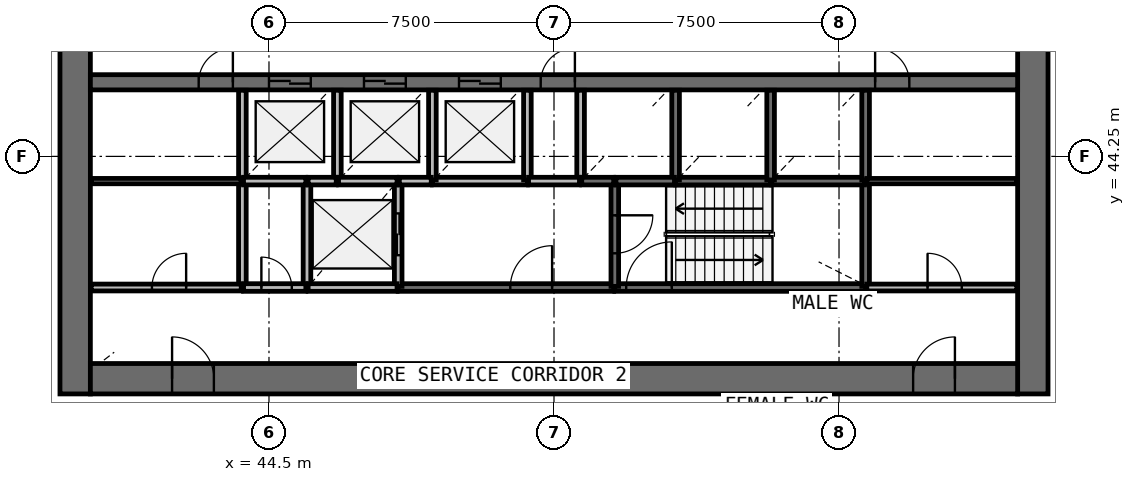
"""IFC4 building model, lengths in metres.
Left out: names, types, materials, properties, quantities, classifications, styles, units other than length and angle.
Written with IfcOpenShell. Run it as: python <this file> out.ifc"""

import sys

from ifc_helpers import new_model, si_unit, direction, frame, frame_2d, origin, place, context, subcontext, project, spatial, rectangle, extrude, source, transform, mapped, element, fill, save


model = new_model("IFC4")
c1 = context("Model", 3, precision=1e-05, world=origin(), true_north=direction((0.0, 1.0)))
c2 = subcontext(c1, "Body", "Model", "MODEL_VIEW")
j1 = project(units=[si_unit("LENGTHUNIT", "METRE"), si_unit("PLANEANGLEUNIT", "RADIAN")], contexts=[c1])
p1 = place(None, origin())
s1 = spatial("IfcSite", under=j1, at=p1, CompositionType="ELEMENT")
p2 = place(p1, origin())
s2 = spatial("IfcBuilding", under=s1, at=p2, CompositionType="ELEMENT")
p3 = place(p2, frame((0.0, 0.0, 100.3)))
s3 = spatial("IfcBuildingStorey", under=s2, at=p3, CompositionType="ELEMENT", Elevation=100.3)
p4 = place(p3, frame((64.6, 38.0, 0.0), z_axis=(0.0, 0.0, 1.0), x_axis=(0.0, 1.0, 0.0)))
e1 = element("IfcWall", 1, at=p4, inside=s3, PredefinedType="SHEAR", context=c2, shape_type="SweptSolid", body=[
    extrude(rectangle(XDim=20.0, YDim=0.8, at=frame_2d((10.0, 0.0))), origin(), (0.0, 0.0, 1.0), 4.1),
])
p5 = place(p4, frame((9.1, 0.0, 0.0)))
e2 = element("IfcOpeningElement", 2, at=p5, cuts=e1, PredefinedType="OPENING", context=c2, shape_type="SweptSolid", body=[
    extrude(rectangle(XDim=1.8, YDim=2.1, at=frame_2d((0.9, 1.05))), frame((0.0, 0.41, 0.0), z_axis=(0.0, -1.0, 0.0), x_axis=(1.0, 0.0, 0.0)), (0.0, 0.0, 1.0), 0.82),
])
p6 = place(p3, frame((39.4, 58.0, 0.0), z_axis=(0.0, 0.0, 1.0), x_axis=(0.0, -1.0, 0.0)))
e3 = element("IfcWall", 3, at=p6, inside=s3, PredefinedType="SHEAR", context=c2, shape_type="SweptSolid", body=[
    extrude(rectangle(XDim=20.0, YDim=0.8, at=frame_2d((10.0, 0.0))), origin(), (0.0, 0.0, 1.0), 4.1),
])
p7 = place(p6, frame((9.1, 0.0, 0.0)))
e4 = element("IfcOpeningElement", 4, at=p7, cuts=e3, PredefinedType="OPENING", context=c2, shape_type="SweptSolid", body=[
    extrude(rectangle(XDim=1.8, YDim=2.1, at=frame_2d((0.9, 1.05))), frame((0.0, 0.41, 0.0), z_axis=(0.0, -1.0, 0.0), x_axis=(1.0, 0.0, 0.0)), (0.0, 0.0, 1.0), 0.82),
])
p8 = place(p3, frame((39.8, 38.4, 0.0), z_axis=(0.0, 0.0, 1.0), x_axis=(1.0, 0.0, 0.0)))
e5 = element("IfcWall", 5, at=p8, inside=s3, PredefinedType="SHEAR", context=c2, shape_type="SweptSolid", body=[
    extrude(rectangle(XDim=24.4, YDim=0.8, at=frame_2d((12.2, 0.0))), origin(), (0.0, 0.0, 1.0), 4.1),
])
p9 = place(p8, frame((21.65, 0.0, 0.0)))
e6 = element("IfcOpeningElement", 6, at=p9, cuts=e5, PredefinedType="OPENING", context=c2, shape_type="SweptSolid", body=[
    extrude(rectangle(XDim=1.1, YDim=2.1, at=frame_2d((0.55, 1.05))), frame((0.0, 0.41, 0.0), z_axis=(0.0, -1.0, 0.0), x_axis=(1.0, 0.0, 0.0)), (0.0, 0.0, 1.0), 0.82),
])
p10 = place(p8, frame((2.15, 0.0, 0.0)))
e7 = element("IfcOpeningElement", 7, at=p10, cuts=e5, PredefinedType="OPENING", context=c2, shape_type="SweptSolid", body=[
    extrude(rectangle(XDim=1.1, YDim=2.1, at=frame_2d((0.55, 1.05))), frame((0.0, 0.41, 0.0), z_axis=(0.0, -1.0, 0.0), x_axis=(1.0, 0.0, 0.0)), (0.0, 0.0, 1.0), 0.82),
])
p11 = place(p3, frame((39.8, 46.2, 0.0), z_axis=(0.0, 0.0, 1.0), x_axis=(1.0, 0.0, 0.0)))
e8 = element("IfcWall", 8, at=p11, inside=s3, PredefinedType="SHEAR", context=c2, shape_type="SweptSolid", body=[
    extrude(rectangle(XDim=24.4, YDim=0.4, at=frame_2d((12.2, 0.0))), origin(), (0.0, 0.0, 1.0), 4.1),
])
p12 = place(p11, frame((4.7, 0.0, 0.0)))
e9 = element("IfcOpeningElement", 9, at=p12, cuts=e8, PredefinedType="OPENING", context=c2, shape_type="SweptSolid", body=[
    extrude(rectangle(XDim=1.1, YDim=2.1, at=frame_2d((0.55, 1.05))), frame((0.0, 0.21, 0.0), z_axis=(0.0, -1.0, 0.0), x_axis=(1.0, 0.0, 0.0)), (0.0, 0.0, 1.0), 0.42),
])
p13 = place(p11, frame((7.2, 0.0, 0.0)))
e10 = element("IfcOpeningElement", 10, at=p13, cuts=e8, PredefinedType="OPENING", context=c2, shape_type="SweptSolid", body=[
    extrude(rectangle(XDim=1.1, YDim=2.1, at=frame_2d((0.55, 1.05))), frame((0.0, 0.21, 0.0), z_axis=(0.0, -1.0, 0.0), x_axis=(1.0, 0.0, 0.0)), (0.0, 0.0, 1.0), 0.42),
])
p14 = place(p11, frame((9.7, 0.0, 0.0)))
e11 = element("IfcOpeningElement", 11, at=p14, cuts=e8, PredefinedType="OPENING", context=c2, shape_type="SweptSolid", body=[
    extrude(rectangle(XDim=1.1, YDim=2.1, at=frame_2d((0.55, 1.05))), frame((0.0, 0.21, 0.0), z_axis=(0.0, -1.0, 0.0), x_axis=(1.0, 0.0, 0.0)), (0.0, 0.0, 1.0), 0.42),
])
p15 = place(p11, frame((20.65, 0.0, 0.0)))
e12 = element("IfcOpeningElement", 12, at=p15, cuts=e8, PredefinedType="OPENING", context=c2, shape_type="SweptSolid", body=[
    extrude(rectangle(XDim=0.9, YDim=2.1, at=frame_2d((0.45, 1.05))), frame((0.0, 0.21, 0.0), z_axis=(0.0, -1.0, 0.0), x_axis=(1.0, 0.0, 0.0)), (0.0, 0.0, 1.0), 0.42),
])
p16 = place(p11, frame((2.85, 0.0, 0.0)))
e13 = element("IfcOpeningElement", 13, at=p16, cuts=e8, PredefinedType="OPENING", context=c2, shape_type="SweptSolid", body=[
    extrude(rectangle(XDim=0.9, YDim=2.1, at=frame_2d((0.45, 1.05))), frame((0.0, 0.21, 0.0), z_axis=(0.0, -1.0, 0.0), x_axis=(1.0, 0.0, 0.0)), (0.0, 0.0, 1.0), 0.42),
])
p17 = place(p11, frame((11.85, 0.0, 0.0)))
e14 = element("IfcOpeningElement", 14, at=p17, cuts=e8, PredefinedType="OPENING", context=c2, shape_type="SweptSolid", body=[
    extrude(rectangle(XDim=0.9, YDim=2.1, at=frame_2d((0.45, 1.05))), frame((0.0, 0.21, 0.0), z_axis=(0.0, -1.0, 0.0), x_axis=(1.0, 0.0, 0.0)), (0.0, 0.0, 1.0), 0.42),
])
p18 = place(p3, frame((53.6, 40.8, 0.0), z_axis=(0.0, 0.0, 1.0), x_axis=(1.0, 0.0, 0.0)))
e15 = element("IfcWall", 15, at=p18, inside=s3, PredefinedType="SOLIDWALL", context=c2, shape_type="SweptSolid", body=[
    extrude(rectangle(XDim=6.6, YDim=0.2, at=frame_2d((3.3, 0.0))), origin(), (0.0, 0.0, 1.0), 3.7),
])
p19 = place(p18, frame((0.3, 0.0, 0.0)))
e16 = element("IfcOpeningElement", 16, at=p19, cuts=e15, PredefinedType="OPENING", context=c2, shape_type="SweptSolid", body=[
    extrude(rectangle(XDim=1.2, YDim=2.1, at=frame_2d((0.6, 1.05))), frame((0.0, 0.11, 0.0), z_axis=(0.0, -1.0, 0.0), x_axis=(1.0, 0.0, 0.0)), (0.0, 0.0, 1.0), 0.22),
])
p20 = place(p3, frame((47.9, 40.8, 0.0), z_axis=(0.0, 0.0, 1.0), x_axis=(1.0, 0.0, 0.0)))
e17 = element("IfcWall", 17, at=p20, inside=s3, PredefinedType="SOLIDWALL", context=c2, shape_type="SweptSolid", body=[
    extrude(rectangle(XDim=5.67, YDim=0.2, at=frame_2d((2.835, 0.0))), origin(), (0.0, 0.0, 1.0), 3.7),
])
p21 = place(p20, frame((2.95, 0.0, 0.0)))
e18 = element("IfcOpeningElement", 18, at=p21, cuts=e17, PredefinedType="OPENING", context=c2, shape_type="SweptSolid", body=[
    extrude(rectangle(XDim=1.1, YDim=2.1, at=frame_2d((0.55, 1.05))), frame((0.0, 0.11, 0.0), z_axis=(0.0, -1.0, 0.0), x_axis=(1.0, 0.0, 0.0)), (0.0, 0.0, 1.0), 0.22),
])
for number, where, z_axis, x_axis in (
    (19, (43.8, 43.6, 0.0), (0.0, 0.0, 1.0), (0.0, -1.0, 0.0)),
    (20, (45.5, 43.6, 0.0), (0.0, 0.0, 1.0), (0.0, -1.0, 0.0)),
):
    element("IfcWall", number, at=place(p3, frame(where, z_axis=z_axis, x_axis=x_axis)), inside=s3, PredefinedType="SOLIDWALL", context=c2, shape_type="SweptSolid", body=[
        extrude(rectangle(XDim=2.8, YDim=0.2, at=frame_2d((1.4, 0.0))), origin(), (0.0, 0.0, 1.0), 3.7),
    ])
p22 = place(p3, frame((47.9, 40.83, 0.0), z_axis=(0.0, 0.0, 1.0), x_axis=(0.0, 1.0, 0.0)))
e21 = element("IfcWall", 21, at=p22, inside=s3, PredefinedType="SOLIDWALL", context=c2, shape_type="SweptSolid", body=[
    extrude(rectangle(XDim=2.77, YDim=0.2, at=frame_2d((1.385, 0.0))), origin(), (0.0, 0.0, 1.0), 3.7),
])
p23 = place(p22, frame((0.82, 0.0, 0.0)))
e22 = element("IfcOpeningElement", 22, at=p23, cuts=e21, PredefinedType="OPENING", context=c2, shape_type="SweptSolid", body=[
    extrude(rectangle(XDim=1.1, YDim=2.1, at=frame_2d((0.55, 1.05))), frame((0.0, 0.11, 0.0), z_axis=(0.0, -1.0, 0.0), x_axis=(1.0, 0.0, 0.0)), (0.0, 0.0, 1.0), 0.22),
])
p24 = place(p3, frame((60.2, 40.83, 0.0), z_axis=(0.0, 0.0, 1.0), x_axis=(0.0, 1.0, 0.0)))
e23 = element("IfcWall", 23, at=p24, inside=s3, PredefinedType="SOLIDWALL", context=c2, shape_type="SweptSolid", body=[
    extrude(rectangle(XDim=2.77, YDim=0.2, at=frame_2d((1.385, 0.0))), origin(), (0.0, 0.0, 1.0), 3.7),
])
p25 = place(p3, frame((53.6, 43.6, 0.0), z_axis=(0.0, 0.0, 1.0), x_axis=(0.0, -1.0, 0.0)))
e24 = element("IfcWall", 24, at=p25, inside=s3, PredefinedType="SOLIDWALL", context=c2, shape_type="SweptSolid", body=[
    extrude(rectangle(XDim=2.77, YDim=0.2, at=frame_2d((1.385, 0.0))), origin(), (0.0, 0.0, 1.0), 3.7),
])
p26 = place(p25, frame((0.9, 0.0, 0.0)))
e25 = element("IfcOpeningElement", 25, at=p26, cuts=e24, PredefinedType="OPENING", context=c2, shape_type="SweptSolid", body=[
    extrude(rectangle(XDim=1.0, YDim=2.1, at=frame_2d((0.5, 1.05))), frame((0.0, 0.11, 0.0), z_axis=(0.0, -1.0, 0.0), x_axis=(1.0, 0.0, 0.0)), (0.0, 0.0, 1.0), 0.22),
])
for number, where, z_axis, x_axis in (
    (26, (48.8, 43.6, 0.0), (0.0, 0.0, 1.0), (1.0, 0.0, 0.0)),
    (27, (55.2, 43.6, 0.0), (0.0, 0.0, 1.0), (1.0, 0.0, 0.0)),
):
    element("IfcWall", number, at=place(p3, frame(where, z_axis=z_axis, x_axis=x_axis)), inside=s3, PredefinedType="SOLIDWALL", context=c2, shape_type="SweptSolid", body=[
        extrude(rectangle(XDim=2.5, YDim=0.2, at=frame_2d((1.25, 0.0))), origin(), (0.0, 0.0, 1.0), 3.7),
    ])
p27 = place(p3, frame((57.73, 43.6, 0.0), z_axis=(0.0, 0.0, 1.0), x_axis=(1.0, 0.0, 0.0)))
e28 = element("IfcWall", 28, at=p27, inside=s3, PredefinedType="SOLIDWALL", context=c2, shape_type="SweptSolid", body=[
    extrude(rectangle(XDim=2.44, YDim=0.2, at=frame_2d((1.22, 0.0))), origin(), (0.0, 0.0, 1.0), 3.7),
])
p28 = place(p3, frame((45.53, 40.8, 0.0), z_axis=(0.0, 0.0, 1.0), x_axis=(1.0, 0.0, 0.0)))
e29 = element("IfcWall", 29, at=p28, inside=s3, PredefinedType="SOLIDWALL", context=c2, shape_type="SweptSolid", body=[
    extrude(rectangle(XDim=2.34, YDim=0.2, at=frame_2d((1.17, 0.0))), origin(), (0.0, 0.0, 1.0), 3.7),
])
p29 = place(p3, frame((43.8, 45.99, 0.0), z_axis=(0.0, 0.0, 1.0), x_axis=(0.0, -1.0, 0.0)))
e30 = element("IfcWall", 30, at=p29, inside=s3, PredefinedType="SOLIDWALL", context=c2, shape_type="SweptSolid", body=[
    extrude(rectangle(XDim=2.36, YDim=0.2, at=frame_2d((1.18, 0.0))), origin(), (0.0, 0.0, 1.0), 3.7),
])
p30 = place(p3, frame((46.3, 43.6, 0.0), z_axis=(0.0, 0.0, 1.0), x_axis=(0.0, 1.0, 0.0)))
e31 = element("IfcWall", 31, at=p30, inside=s3, PredefinedType="SOLIDWALL", context=c2, shape_type="SweptSolid", body=[
    extrude(rectangle(XDim=2.39, YDim=0.2, at=frame_2d((1.195, 0.0))), origin(), (0.0, 0.0, 1.0), 3.7),
])
for number, where, z_axis, x_axis in (
    (32, (48.8, 43.63, 0.0), (0.0, 0.0, 1.0), (0.0, 1.0, 0.0)),
    (33, (51.3, 43.63, 0.0), (0.0, 0.0, 1.0), (0.0, 1.0, 0.0)),
):
    element("IfcWall", number, at=place(p3, frame(where, z_axis=z_axis, x_axis=x_axis)), inside=s3, PredefinedType="SOLIDWALL", context=c2, shape_type="SweptSolid", body=[
        extrude(rectangle(XDim=2.36, YDim=0.2, at=frame_2d((1.18, 0.0))), origin(), (0.0, 0.0, 1.0), 3.7),
    ])
p31 = place(p3, frame((52.7, 45.99, 0.0), z_axis=(0.0, 0.0, 1.0), x_axis=(0.0, -1.0, 0.0)))
e34 = element("IfcWall", 34, at=p31, inside=s3, PredefinedType="SOLIDWALL", context=c2, shape_type="SweptSolid", body=[
    extrude(rectangle(XDim=2.39, YDim=0.2, at=frame_2d((1.195, 0.0))), origin(), (0.0, 0.0, 1.0), 3.7),
])
for number, where, z_axis, x_axis in (
    (35, (55.2, 43.63, 0.0), (0.0, 0.0, 1.0), (0.0, 1.0, 0.0)),
    (36, (57.7, 43.63, 0.0), (0.0, 0.0, 1.0), (0.0, 1.0, 0.0)),
    (37, (60.2, 43.63, 0.0), (0.0, 0.0, 1.0), (0.0, 1.0, 0.0)),
):
    element("IfcWall", number, at=place(p3, frame(where, z_axis=z_axis, x_axis=x_axis)), inside=s3, PredefinedType="SOLIDWALL", context=c2, shape_type="SweptSolid", body=[
        extrude(rectangle(XDim=2.36, YDim=0.2, at=frame_2d((1.18, 0.0))), origin(), (0.0, 0.0, 1.0), 3.7),
    ])
p32 = place(p3, frame((43.83, 43.6, 0.0), z_axis=(0.0, 0.0, 1.0), x_axis=(1.0, 0.0, 0.0)))
e38 = element("IfcWall", 38, at=p32, inside=s3, PredefinedType="SOLIDWALL", context=c2, shape_type="SweptSolid", body=[
    extrude(rectangle(XDim=1.64, YDim=0.2, at=frame_2d((0.82, 0.0))), origin(), (0.0, 0.0, 1.0), 3.7),
])
p33 = place(p3, frame((43.83, 40.8, 0.0), z_axis=(0.0, 0.0, 1.0), x_axis=(1.0, 0.0, 0.0)))
e39 = element("IfcWall", 39, at=p33, inside=s3, PredefinedType="SOLIDWALL", context=c2, shape_type="SweptSolid", body=[
    extrude(rectangle(XDim=1.64, YDim=0.2, at=frame_2d((0.82, 0.0))), origin(), (0.0, 0.0, 1.0), 3.7),
])
p34 = place(p33, frame((0.47, 0.0, 0.0)))
e40 = element("IfcOpeningElement", 40, at=p34, cuts=e39, PredefinedType="OPENING", context=c2, shape_type="SweptSolid", body=[
    extrude(rectangle(XDim=0.8, YDim=2.1, at=frame_2d((0.4, 1.05))), frame((0.0, 0.11, 0.0), z_axis=(0.0, -1.0, 0.0), x_axis=(1.0, 0.0, 0.0)), (0.0, 0.0, 1.0), 0.22),
])
for number, where, z_axis, x_axis in (
    (41, (46.33, 43.6, 0.0), (0.0, 0.0, 1.0), (1.0, 0.0, 0.0)),
    (42, (53.63, 43.6, 0.0), (0.0, 0.0, 1.0), (1.0, 0.0, 0.0)),
):
    element("IfcWall", number, at=place(p3, frame(where, z_axis=z_axis, x_axis=x_axis)), inside=s3, PredefinedType="SOLIDWALL", context=c2, shape_type="SweptSolid", body=[
        extrude(rectangle(XDim=1.54, YDim=0.2, at=frame_2d((0.77, 0.0))), origin(), (0.0, 0.0, 1.0), 3.7),
    ])
p35 = place(p3, frame((52.67, 43.6, 0.0), z_axis=(0.0, 0.0, 1.0), x_axis=(-1.0, 0.0, 0.0)))
e43 = element("IfcWall", 43, at=p35, inside=s3, PredefinedType="SOLIDWALL", context=c2, shape_type="SweptSolid", body=[
    extrude(rectangle(XDim=1.34, YDim=0.2, at=frame_2d((0.67, 0.0))), origin(), (0.0, 0.0, 1.0), 3.7),
])
for number, where, z_axis, x_axis in (
    (44, (47.93, 43.6, 0.0), (0.0, 0.0, 1.0), (1.0, 0.0, 0.0)),
    (45, (52.73, 43.6, 0.0), (0.0, 0.0, 1.0), (1.0, 0.0, 0.0)),
):
    element("IfcWall", number, at=place(p3, frame(where, z_axis=z_axis, x_axis=x_axis)), inside=s3, PredefinedType="SOLIDWALL", context=c2, shape_type="SweptSolid", body=[
        extrude(rectangle(XDim=0.84, YDim=0.2, at=frame_2d((0.42, 0.0))), origin(), (0.0, 0.0, 1.0), 3.7),
    ])
p36 = place(p3, frame((45.53, 43.6, 0.0), z_axis=(0.0, 0.0, 1.0), x_axis=(1.0, 0.0, 0.0)))
e46 = element("IfcWall", 46, at=p36, inside=s3, PredefinedType="SOLIDWALL", context=c2, shape_type="SweptSolid", body=[
    extrude(rectangle(XDim=0.74, YDim=0.2, at=frame_2d((0.37, 0.0))), origin(), (0.0, 0.0, 1.0), 3.7),
])
p37 = place(p3, frame((60.23, 40.8, 0.0), z_axis=(0.0, 0.0, 1.0), x_axis=(1.0, 0.0, 0.0)))
e47 = element("IfcWall", 47, at=p37, inside=s3, PredefinedType="PARTITIONING", context=c2, shape_type="SweptSolid", body=[
    extrude(rectangle(XDim=3.95, YDim=0.18, at=frame_2d((1.975, 0.0))), origin(), (0.0, 0.0, 1.0), 3.7),
])
p38 = place(p37, frame((1.6, 0.0, 0.0)))
e48 = element("IfcOpeningElement", 48, at=p38, cuts=e47, PredefinedType="OPENING", context=c2, shape_type="SweptSolid", body=[
    extrude(rectangle(XDim=0.9, YDim=2.1, at=frame_2d((0.45, 1.05))), frame((0.0, 0.1, 0.0), z_axis=(0.0, -1.0, 0.0), x_axis=(1.0, 0.0, 0.0)), (0.0, 0.0, 1.0), 0.2),
])
p39 = place(p3, frame((39.82, 40.8, 0.0), z_axis=(0.0, 0.0, 1.0), x_axis=(1.0, 0.0, 0.0)))
e49 = element("IfcWall", 49, at=p39, inside=s3, PredefinedType="PARTITIONING", context=c2, shape_type="SweptSolid", body=[
    extrude(rectangle(XDim=3.95, YDim=0.18, at=frame_2d((1.975, 0.0))), origin(), (0.0, 0.0, 1.0), 3.7),
])
p40 = place(p39, frame((1.6, 0.0, 0.0)))
e50 = element("IfcOpeningElement", 50, at=p40, cuts=e49, PredefinedType="OPENING", context=c2, shape_type="SweptSolid", body=[
    extrude(rectangle(XDim=0.9, YDim=2.1, at=frame_2d((0.45, 1.05))), frame((0.0, 0.1, 0.0), z_axis=(0.0, -1.0, 0.0), x_axis=(1.0, 0.0, 0.0)), (0.0, 0.0, 1.0), 0.2),
])
for number, where, z_axis, x_axis in (
    (51, (60.23, 43.6, 0.0), (0.0, 0.0, 1.0), (1.0, 0.0, 0.0)),
    (52, (43.77, 43.6, 0.0), (0.0, 0.0, 1.0), (-1.0, 0.0, 0.0)),
):
    element("IfcWall", number, at=place(p3, frame(where, z_axis=z_axis, x_axis=x_axis)), inside=s3, PredefinedType="PARTITIONING", context=c2, shape_type="SweptSolid", body=[
        extrude(rectangle(XDim=3.95, YDim=0.14, at=frame_2d((1.975, 0.0))), origin(), (0.0, 0.0, 1.0), 2.9),
    ])
m1 = source(origin(), c2, "Body", "SweptSolid", [
    extrude(rectangle(XDim=1.1, YDim=2.1, at=frame_2d((0.55, 1.05))), frame((0.0, 0.025, 0.0), z_axis=(0.0, -1.0, 0.0), x_axis=(1.0, 0.0, 0.0)), (0.0, 0.0, 1.0), 0.05),
])
p41 = place(p12, origin())
e53 = element("IfcDoor", 53, at=p41, inside=s3, OperationType="DOUBLE_DOOR_SLIDING", PredefinedType="USERDEFINED", context=c2, shape_type="MappedRepresentation", body=[
    mapped(m1, transform((0.0, 0.0, 0.0), scale=1.0)),
])
fill(e9, e53)
p42 = place(p13, origin())
e54 = element("IfcDoor", 54, at=p42, inside=s3, OperationType="DOUBLE_DOOR_SLIDING", PredefinedType="USERDEFINED", context=c2, shape_type="MappedRepresentation", body=[
    mapped(m1, transform((0.0, 0.0, 0.0), scale=1.0)),
])
fill(e10, e54)
p43 = place(p14, origin())
e55 = element("IfcDoor", 55, at=p43, inside=s3, OperationType="DOUBLE_DOOR_SLIDING", PredefinedType="USERDEFINED", context=c2, shape_type="MappedRepresentation", body=[
    mapped(m1, transform((0.0, 0.0, 0.0), scale=1.0)),
])
fill(e11, e55)
p44 = place(p23, origin())
e56 = element("IfcDoor", 56, at=p44, inside=s3, OperationType="DOUBLE_DOOR_SLIDING", PredefinedType="USERDEFINED", context=c2, shape_type="MappedRepresentation", body=[
    mapped(m1, transform((0.0, 0.0, 0.0), scale=1.0)),
])
fill(e22, e56)
m2 = source(origin(), c2, "Body", "SweptSolid", [
    extrude(rectangle(XDim=1.2, YDim=2.1, at=frame_2d((0.6, 1.05))), frame((0.0, 0.025, 0.0), z_axis=(0.0, -1.0, 0.0), x_axis=(1.0, 0.0, 0.0)), (0.0, 0.0, 1.0), 0.05),
])
p45 = place(p19, origin())
e57 = element("IfcDoor", 57, at=p45, inside=s3, OperationType="SINGLE_SWING_RIGHT", PredefinedType="DOOR", context=c2, shape_type="MappedRepresentation", body=[
    mapped(m2, transform((0.0, 0.0, 0.0), scale=1.0)),
])
fill(e16, e57)
m3 = source(origin(), c2, "Body", "SweptSolid", [
    extrude(rectangle(XDim=1.0, YDim=2.1, at=frame_2d((0.5, 1.05))), frame((0.0, 0.025, 0.0), z_axis=(0.0, -1.0, 0.0), x_axis=(1.0, 0.0, 0.0)), (0.0, 0.0, 1.0), 0.05),
])
p46 = place(p26, origin())
e58 = element("IfcDoor", 58, at=p46, inside=s3, OperationType="SINGLE_SWING_LEFT", PredefinedType="DOOR", context=c2, shape_type="MappedRepresentation", body=[
    mapped(m3, transform((0.0, 0.0, 0.0), scale=1.0)),
])
fill(e25, e58)
m4 = source(origin(), c2, "Body", "SweptSolid", [
    extrude(rectangle(XDim=1.1, YDim=2.1, at=frame_2d((0.55, 1.05))), frame((0.0, 0.025, 0.0), z_axis=(0.0, -1.0, 0.0), x_axis=(1.0, 0.0, 0.0)), (0.0, 0.0, 1.0), 0.05),
])
p47 = place(p21, origin())
e59 = element("IfcDoor", 59, at=p47, inside=s3, OperationType="SINGLE_SWING_RIGHT", PredefinedType="DOOR", context=c2, shape_type="MappedRepresentation", body=[
    mapped(m4, transform((0.0, 0.0, 0.0), scale=1.0)),
])
fill(e18, e59)
m5 = source(origin(), c2, "Body", "SweptSolid", [
    extrude(rectangle(XDim=0.8, YDim=2.1, at=frame_2d((0.4, 1.05))), frame((0.0, 0.025, 0.0), z_axis=(0.0, -1.0, 0.0), x_axis=(1.0, 0.0, 0.0)), (0.0, 0.0, 1.0), 0.05),
])
p48 = place(p34, origin())
e60 = element("IfcDoor", 60, at=p48, inside=s3, OperationType="SINGLE_SWING_LEFT", PredefinedType="DOOR", context=c2, shape_type="MappedRepresentation", body=[
    mapped(m5, transform((0.0, 0.0, 0.0), scale=1.0)),
])
fill(e40, e60)
m6 = source(origin(), c2, "Body", "SweptSolid", [
    extrude(rectangle(XDim=1.1, YDim=2.1, at=frame_2d((0.55, 1.05))), frame((0.0, 0.025, 0.0), z_axis=(0.0, -1.0, 0.0), x_axis=(1.0, 0.0, 0.0)), (0.0, 0.0, 1.0), 0.05),
])
p49 = place(p9, origin())
e61 = element("IfcDoor", 61, at=p49, inside=s3, OperationType="SINGLE_SWING_RIGHT", PredefinedType="DOOR", context=c2, shape_type="MappedRepresentation", body=[
    mapped(m6, transform((0.0, 0.0, 0.0), scale=1.0)),
])
fill(e6, e61)
p50 = place(p10, origin())
e62 = element("IfcDoor", 62, at=p50, inside=s3, OperationType="SINGLE_SWING_LEFT", PredefinedType="DOOR", context=c2, shape_type="MappedRepresentation", body=[
    mapped(m6, transform((0.0, 0.0, 0.0), scale=1.0)),
])
fill(e7, e62)
m7 = source(origin(), c2, "Body", "SweptSolid", [
    extrude(rectangle(XDim=0.9, YDim=2.1, at=frame_2d((0.45, 1.05))), frame((0.0, 0.025, 0.0), z_axis=(0.0, -1.0, 0.0), x_axis=(1.0, 0.0, 0.0)), (0.0, 0.0, 1.0), 0.05),
])
p51 = place(p40, origin())
e63 = element("IfcDoor", 63, at=p51, inside=s3, OperationType="SINGLE_SWING_RIGHT", PredefinedType="DOOR", context=c2, shape_type="MappedRepresentation", body=[
    mapped(m7, transform((0.0, 0.0, 0.0), scale=1.0)),
])
fill(e50, e63)
p52 = place(p15, origin())
e64 = element("IfcDoor", 64, at=p52, inside=s3, OperationType="SINGLE_SWING_LEFT", PredefinedType="DOOR", context=c2, shape_type="MappedRepresentation", body=[
    mapped(m7, transform((0.0, 0.0, 0.0), scale=1.0)),
])
fill(e12, e64)
p53 = place(p38, origin())
e65 = element("IfcDoor", 65, at=p53, inside=s3, OperationType="SINGLE_SWING_LEFT", PredefinedType="DOOR", context=c2, shape_type="MappedRepresentation", body=[
    mapped(m7, transform((0.0, 0.0, 0.0), scale=1.0)),
])
fill(e48, e65)
p54 = place(p16, origin())
e66 = element("IfcDoor", 66, at=p54, inside=s3, OperationType="SINGLE_SWING_RIGHT", PredefinedType="DOOR", context=c2, shape_type="MappedRepresentation", body=[
    mapped(m7, transform((0.0, 0.0, 0.0), scale=1.0)),
])
fill(e13, e66)
p55 = place(p17, origin())
e67 = element("IfcDoor", 67, at=p55, inside=s3, OperationType="SINGLE_SWING_RIGHT", PredefinedType="DOOR", context=c2, shape_type="MappedRepresentation", body=[
    mapped(m7, transform((0.0, 0.0, 0.0), scale=1.0)),
])
fill(e14, e67)
save(model, sys.argv[1])
